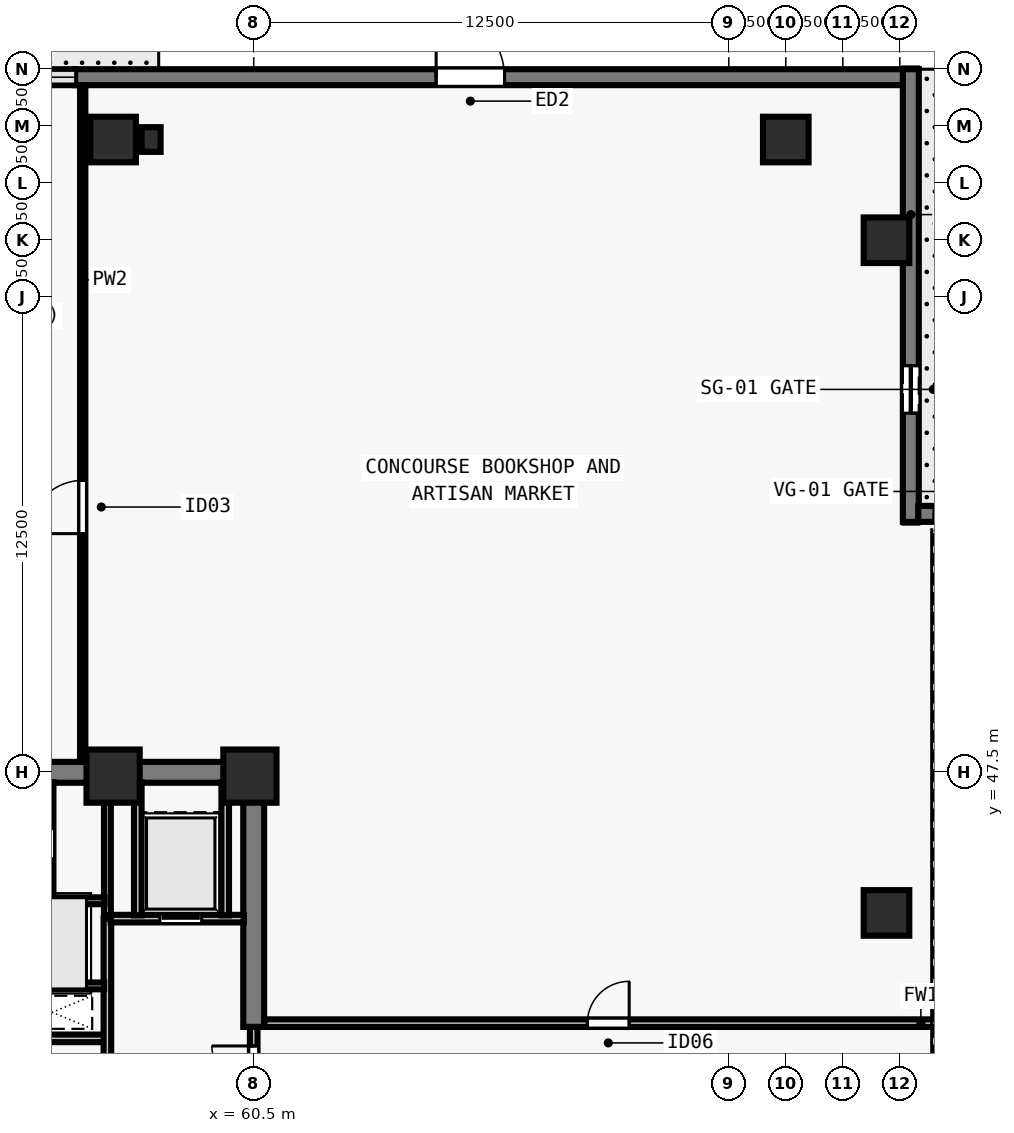
"""IFC4 building model, lengths in metres.
Left out: names, types, materials, properties, quantities, classifications, styles, units other than length and angle.
Written with IfcOpenShell. Run it as: python <this file> out.ifc"""

import sys

from ifc_helpers import new_model, si_unit, direction, frame, frame_2d, origin, origin_2d, place, context, subcontext, project, spatial, rectangle, extrude, element, fill, save


model = new_model("IFC4")
c1 = context("Model", 3, precision=1e-05, world=origin(), true_north=direction((0.0, 1.0)))
c2 = subcontext(c1, "Body", "Model", "MODEL_VIEW")
j1 = project(units=[si_unit("LENGTHUNIT", "METRE"), si_unit("PLANEANGLEUNIT", "RADIAN")], contexts=[c1])
p1 = place(None, origin())
s1 = spatial("IfcSite", under=j1, at=p1, CompositionType="ELEMENT")
p2 = place(p1, origin())
s2 = spatial("IfcBuilding", under=s1, at=p2, CompositionType="ELEMENT")
p3 = place(p2, origin())
s3 = spatial("IfcBuildingStorey", under=s2, at=p3, CompositionType="ELEMENT", Elevation=0.0)
for number, where, z_axis, x_axis in (
    (1, (56.8, 47.4, 0.0), (0.0, 0.0, 1.0), (1.0, 0.0, 0.0)),
    (2, (60.4, 47.4, 0.0), (0.0, 0.0, 1.0), (1.0, 0.0, 0.0)),
):
    element("IfcColumn", number, at=place(p3, frame(where, z_axis=z_axis, x_axis=x_axis)), inside=s3, PredefinedType="COLUMN", context=c2, shape_type="SweptSolid", body=[
        extrude(rectangle(XDim=1.4, YDim=1.4, at=origin_2d()), origin(), (0.0, 0.0, 1.0), 5.0),
    ])
for number, where, z_axis, x_axis in (
    (3, (77.15, 43.8, 0.0), (0.0, 0.0, 1.0), (1.0, 0.0, 0.0)),
    (4, (77.15, 61.5, 0.0), (0.0, 0.0, 1.0), (1.0, 0.0, 0.0)),
    (5, (74.5, 64.15, 0.0), (0.0, 0.0, 1.0), (1.0, 0.0, 0.0)),
    (6, (56.8, 64.15, 0.0), (0.0, 0.0, 1.0), (1.0, 0.0, 0.0)),
):
    element("IfcColumn", number, at=place(p3, frame(where, z_axis=z_axis, x_axis=x_axis)), inside=s3, PredefinedType="COLUMN", context=c2, shape_type="SweptSolid", body=[
        extrude(rectangle(XDim=1.2, YDim=1.2, at=origin_2d()), origin(), (0.0, 0.0, 1.0), 5.0),
    ])
p4 = place(p3, frame((57.8, 64.15, 0.0), z_axis=(0.0, 0.0, 1.0), x_axis=(1.0, 0.0, 0.0)))
e7 = element("IfcColumn", 7, at=p4, inside=s3, PredefinedType="PILASTER", context=c2, shape_type="SweptSolid", body=[
    extrude(rectangle(XDim=0.5, YDim=0.65, at=origin_2d()), origin(), (0.0, 0.0, 1.0), 5.0),
])
p5 = place(p3, frame((48.2, 65.79, 0.0), z_axis=(0.0, 0.0, 1.0), x_axis=(1.0, 0.0, 0.0)))
e8 = element("IfcWall", 8, at=p5, inside=s3, PredefinedType="SOLIDWALL", context=c2, shape_type="SweptSolid", body=[
    extrude(rectangle(XDim=7.6, YDim=0.42, at=frame_2d((3.8, 0.0))), origin(), (0.0, 0.0, 1.0), 2.85),
])
p6 = place(p5, frame((2.6, 0.0, 0.0)))
e9 = element("IfcOpeningElement", 9, at=p6, cuts=e8, PredefinedType="OPENING", context=c2, shape_type="SweptSolid", body=[
    extrude(rectangle(XDim=2.4, YDim=2.7, at=frame_2d((1.2, 1.35))), frame((0.0, 0.22, 0.0), z_axis=(0.0, -1.0, 0.0), x_axis=(1.0, 0.0, 0.0)), (0.0, 0.0, 1.0), 0.44),
])
p7 = place(p3, frame((55.8, 65.79, 0.0), z_axis=(0.0, 0.0, 1.0), x_axis=(1.0, 0.0, 0.0)))
e10 = element("IfcWall", 10, at=p7, inside=s3, PredefinedType="SOLIDWALL", context=c2, shape_type="SweptSolid", body=[
    extrude(rectangle(XDim=21.795, YDim=0.42, at=frame_2d((10.897, 0.0))), origin(), (0.0, 0.0, 1.0), 4.7),
])
p8 = place(p7, frame((9.5, 0.0, 0.0)))
e11 = element("IfcOpeningElement", 11, at=p8, cuts=e10, PredefinedType="OPENING", context=c2, shape_type="SweptSolid", body=[
    extrude(rectangle(XDim=1.8, YDim=2.35, at=frame_2d((0.9, 1.175))), frame((0.0, 0.22, 0.0), z_axis=(0.0, -1.0, 0.0), x_axis=(1.0, 0.0, 0.0)), (0.0, 0.0, 1.0), 0.44),
])
p9 = place(p3, frame((77.79, 66.0, 0.0), z_axis=(0.0, 0.0, 1.0), x_axis=(0.0, -1.0, 0.0)))
e12 = element("IfcWall", 12, at=p9, inside=s3, PredefinedType="SOLIDWALL", context=c2, shape_type="SweptSolid", body=[
    extrude(rectangle(XDim=11.91, YDim=0.42, at=frame_2d((5.955, 0.0))), origin(), (0.0, 0.0, 1.0), 4.7),
])
p10 = place(p9, frame((7.8, 0.0, 0.0)))
e13 = element("IfcOpeningElement", 13, at=p10, cuts=e12, PredefinedType="OPENING", context=c2, shape_type="SweptSolid", body=[
    extrude(rectangle(XDim=1.25, YDim=2.15, at=frame_2d((0.625, 1.075))), frame((0.0, 0.22, 0.0), z_axis=(0.0, -1.0, 0.0), x_axis=(1.0, 0.0, 0.0)), (0.0, 0.0, 1.0), 0.44),
])
p11 = place(p3, frame((77.985, 54.3, 0.0), z_axis=(0.0, 0.0, 1.0), x_axis=(1.0, 0.0, 0.0)))
e14 = element("IfcWall", 14, at=p11, inside=s3, PredefinedType="SOLIDWALL", context=c2, shape_type="SweptSolid", body=[
    extrude(rectangle(XDim=7.61, YDim=0.42, at=frame_2d((3.805, 0.0))), origin(), (0.0, 0.0, 1.0), 4.7),
])
p12 = place(p11, frame((0.415, 0.0, 0.0)))
e15 = element("IfcOpeningElement", 15, at=p12, cuts=e14, PredefinedType="OPENING", context=c2, shape_type="SweptSolid", body=[
    extrude(rectangle(XDim=6.2, YDim=3.1, at=frame_2d((3.1, 1.55))), frame((0.0, 0.22, 0.0), z_axis=(0.0, -1.0, 0.0), x_axis=(1.0, 0.0, 0.0)), (0.0, 0.0, 1.0), 0.44),
])
p13 = place(p3, frame((43.225, 47.5, 0.0), z_axis=(0.0, 0.0, 1.0), x_axis=(1.0, 0.0, 0.0)))
e16 = element("IfcWall", 16, at=p13, inside=s3, PredefinedType="SHEAR", context=c2, shape_type="SweptSolid", body=[
    extrude(rectangle(XDim=17.55, YDim=0.55, at=frame_2d((8.775, 0.0))), origin(), (0.0, 0.0, 1.0), 4.7),
])
p14 = place(p3, frame((60.5, 40.8, 0.0), z_axis=(0.0, 0.0, 1.0), x_axis=(0.0, 1.0, 0.0)))
e17 = element("IfcWall", 17, at=p14, inside=s3, PredefinedType="SHEAR", context=c2, shape_type="SweptSolid", body=[
    extrude(rectangle(XDim=6.435, YDim=0.55, at=frame_2d((3.218, 0.0))), origin(), (0.0, 0.0, 1.0), 4.7),
])
p15 = place(p3, frame((53.7, 40.5, 0.0), z_axis=(0.0, 0.0, 1.0), x_axis=(1.0, 0.0, 0.0)))
e18 = element("IfcWall", 18, at=p15, inside=s3, PredefinedType="SOLIDWALL", context=c2, shape_type="SweptSolid", body=[
    extrude(rectangle(XDim=2.95, YDim=0.2, at=frame_2d((1.475, 0.0))), origin(), (0.0, 0.0, 1.0), 4.7),
])
p16 = place(p3, frame((60.5, 38.75, 0.0), z_axis=(0.0, 0.0, 1.0), x_axis=(0.0, 1.0, 0.0)))
e19 = element("IfcWall", 19, at=p16, inside=s3, PredefinedType="SOLIDWALL", context=c2, shape_type="SweptSolid", body=[
    extrude(rectangle(XDim=2.05, YDim=0.2, at=frame_2d((1.025, 0.0))), origin(), (0.0, 0.0, 1.0), 4.7),
])
p17 = place(p16, frame((0.45, 0.0, 0.0)))
e20 = element("IfcOpeningElement", 20, at=p17, cuts=e19, PredefinedType="OPENING", context=c2, shape_type="SweptSolid", body=[
    extrude(rectangle(XDim=1.1, YDim=2.15, at=frame_2d((0.55, 1.075))), frame((0.0, 0.11, 0.0), z_axis=(0.0, -1.0, 0.0), x_axis=(1.0, 0.0, 0.0)), (0.0, 0.0, 1.0), 0.22),
])
p18 = place(p3, frame((56.65, 38.785, 0.0), z_axis=(0.0, 0.0, 1.0), x_axis=(0.0, 1.0, 0.0)))
e21 = element("IfcWall", 21, at=p18, inside=s3, PredefinedType="SOLIDWALL", context=c2, shape_type="SweptSolid", body=[
    extrude(rectangle(XDim=4.865, YDim=0.2, at=frame_2d((2.433, 0.0))), origin(), (0.0, 0.0, 1.0), 4.7),
])
p19 = place(p18, frame((0.265, 0.0, 0.0)))
e22 = element("IfcOpeningElement", 22, at=p19, cuts=e21, PredefinedType="OPENING", context=c2, shape_type="SweptSolid", body=[
    extrude(rectangle(XDim=1.0, YDim=2.15, at=frame_2d((0.5, 1.075))), frame((0.0, 0.11, 0.0), z_axis=(0.0, -1.0, 0.0), x_axis=(1.0, 0.0, 0.0)), (0.0, 0.0, 1.0), 0.22),
])
p20 = place(p3, frame((56.735, 43.65, 0.0), z_axis=(0.0, 0.0, 1.0), x_axis=(1.0, 0.0, 0.0)))
e23 = element("IfcWall", 23, at=p20, inside=s3, PredefinedType="SOLIDWALL", context=c2, shape_type="SweptSolid", body=[
    extrude(rectangle(XDim=3.505, YDim=0.2, at=frame_2d((1.752, 0.0))), origin(), (0.0, 0.0, 1.0), 4.7),
])
p21 = place(p20, frame((1.295, 0.0, 0.0)))
e24 = element("IfcOpeningElement", 24, at=p21, cuts=e23, PredefinedType="OPENING", context=c2, shape_type="SweptSolid", body=[
    extrude(rectangle(XDim=1.1, YDim=2.2, at=frame_2d((0.55, 1.1))), frame((0.0, 0.11, 0.0), z_axis=(0.0, -1.0, 0.0), x_axis=(1.0, 0.0, 0.0)), (0.0, 0.0, 1.0), 0.22),
])
for number, where, z_axis, x_axis in (
    (25, (57.45, 43.735, 0.0), (0.0, 0.0, 1.0), (0.0, 1.0, 0.0)),
    (26, (59.75, 43.735, 0.0), (0.0, 0.0, 1.0), (0.0, 1.0, 0.0)),
):
    element("IfcWall", number, at=place(p3, frame(where, z_axis=z_axis, x_axis=x_axis)), inside=s3, PredefinedType="SOLIDWALL", context=c2, shape_type="SweptSolid", body=[
        extrude(rectangle(XDim=3.505, YDim=0.2, at=frame_2d((1.752, 0.0))), origin(), (0.0, 0.0, 1.0), 4.7),
    ])
p22 = place(p3, frame((56.65, 43.735, 0.0), z_axis=(0.0, 0.0, 1.0), x_axis=(0.0, 1.0, 0.0)))
e27 = element("IfcWall", 27, at=p22, inside=s3, PredefinedType="SOLIDWALL", context=c2, shape_type="SweptSolid", body=[
    extrude(rectangle(XDim=3.505, YDim=0.18, at=frame_2d((1.752, 0.0))), origin(), (0.0, 0.0, 1.0), 4.7),
])
p23 = place(p3, frame((53.785, 41.88, 0.0), z_axis=(0.0, 0.0, 1.0), x_axis=(1.0, 0.0, 0.0)))
e28 = element("IfcWall", 28, at=p23, inside=s3, PredefinedType="SOLIDWALL", context=c2, shape_type="SweptSolid", body=[
    extrude(rectangle(XDim=2.78, YDim=0.18, at=frame_2d((1.39, 0.0))), origin(), (0.0, 0.0, 1.0), 4.7),
])
p24 = place(p3, frame((53.785, 44.12, 0.0), z_axis=(0.0, 0.0, 1.0), x_axis=(1.0, 0.0, 0.0)))
e29 = element("IfcWall", 29, at=p24, inside=s3, PredefinedType="SOLIDWALL", context=c2, shape_type="SweptSolid", body=[
    extrude(rectangle(XDim=2.79, YDim=0.18, at=frame_2d((1.395, 0.0))), origin(), (0.0, 0.0, 1.0), 4.7),
])
p25 = place(p3, frame((55.15, 44.195, 0.0), z_axis=(0.0, 0.0, 1.0), x_axis=(0.0, 1.0, 0.0)))
e30 = element("IfcWall", 30, at=p25, inside=s3, PredefinedType="PARTITIONING", context=c2, shape_type="SweptSolid", body=[
    extrude(rectangle(XDim=3.045, YDim=0.16, at=frame_2d((1.522, 0.0))), origin(), (0.0, 0.0, 1.0), 4.7),
])
p26 = place(p25, frame((1.025, 0.0, 0.0)))
e31 = element("IfcOpeningElement", 31, at=p26, cuts=e30, PredefinedType="OPENING", context=c2, shape_type="SweptSolid", body=[
    extrude(rectangle(XDim=0.8, YDim=2.1, at=frame_2d((0.4, 1.05))), frame((0.0, 0.09, 0.0), z_axis=(0.0, -1.0, 0.0), x_axis=(1.0, 0.0, 0.0)), (0.0, 0.0, 1.0), 0.18),
])
p27 = place(p3, frame((56.0, 47.78, 0.0), z_axis=(0.0, 0.0, 1.0), x_axis=(0.0, 1.0, 0.0)))
e32 = element("IfcWall", 32, at=p27, inside=s3, PredefinedType="PARTITIONING", context=c2, shape_type="SweptSolid", body=[
    extrude(rectangle(XDim=17.8, YDim=0.14, at=frame_2d((8.9, 0.0))), origin(), (0.0, 0.0, 1.0), 4.7),
])
p28 = place(p27, frame((6.0, 0.0, 0.0)))
e33 = element("IfcOpeningElement", 33, at=p28, cuts=e32, PredefinedType="OPENING", context=c2, shape_type="SweptSolid", body=[
    extrude(rectangle(XDim=1.4, YDim=2.2, at=frame_2d((0.7, 1.1))), frame((0.0, 0.08, 0.0), z_axis=(0.0, -1.0, 0.0), x_axis=(1.0, 0.0, 0.0)), (0.0, 0.0, 1.0), 0.16),
])
p29 = place(p3, frame((60.78, 40.9, 0.0), z_axis=(0.0, 0.0, 1.0), x_axis=(1.0, 0.0, 0.0)))
e34 = element("IfcWall", 34, at=p29, inside=s3, PredefinedType="SOLIDWALL", context=c2, shape_type="SweptSolid", body=[
    extrude(rectangle(XDim=24.8, YDim=0.2, at=frame_2d((12.4, 0.0))), origin(), (0.0, 0.0, 1.0), 4.7),
])
p30 = place(p29, frame((8.5, 0.0, 0.0)))
e35 = element("IfcOpeningElement", 35, at=p30, cuts=e34, PredefinedType="OPENING", context=c2, shape_type="SweptSolid", body=[
    extrude(rectangle(XDim=1.1, YDim=2.15, at=frame_2d((0.55, 1.075))), frame((0.0, 0.11, 0.0), z_axis=(0.0, -1.0, 0.0), x_axis=(1.0, 0.0, 0.0)), (0.0, 0.0, 1.0), 0.22),
])
p31 = place(p8, origin())
e36 = element("IfcDoor", 36, at=p31, inside=s3, OperationType="SINGLE_SWING_LEFT", PredefinedType="DOOR", context=c2, shape_type="SweptSolid", body=[
    extrude(rectangle(XDim=1.8, YDim=2.35, at=frame_2d((0.9, 1.175))), frame((0.0, 0.025, 0.0), z_axis=(0.0, -1.0, 0.0), x_axis=(1.0, 0.0, 0.0)), (0.0, 0.0, 1.0), 0.05),
])
fill(e11, e36)
p32 = place(p10, origin())
e37 = element("IfcDoor", 37, at=p32, inside=s3, OperationType="SINGLE_SWING_LEFT", PredefinedType="GATE", context=c2, shape_type="SweptSolid", body=[
    extrude(rectangle(XDim=1.25, YDim=2.15, at=frame_2d((0.625, 1.075))), frame((0.0, 0.025, 0.0), z_axis=(0.0, -1.0, 0.0), x_axis=(1.0, 0.0, 0.0)), (0.0, 0.0, 1.0), 0.05),
])
fill(e13, e37)
p33 = place(p17, origin())
e38 = element("IfcDoor", 38, at=p33, inside=s3, OperationType="SINGLE_SWING_RIGHT", PredefinedType="DOOR", context=c2, shape_type="SweptSolid", body=[
    extrude(rectangle(XDim=1.1, YDim=2.15, at=frame_2d((0.55, 1.075))), frame((0.0, 0.025, 0.0), z_axis=(0.0, -1.0, 0.0), x_axis=(1.0, 0.0, 0.0)), (0.0, 0.0, 1.0), 0.05),
])
fill(e20, e38)
p34 = place(p21, origin())
e39 = element("IfcDoor", 39, at=p34, inside=s3, OperationType="SLIDING_TO_LEFT", PredefinedType="DOOR", context=c2, shape_type="SweptSolid", body=[
    extrude(rectangle(XDim=1.1, YDim=2.2, at=frame_2d((0.55, 1.1))), frame((0.0, 0.025, 0.0), z_axis=(0.0, -1.0, 0.0), x_axis=(1.0, 0.0, 0.0)), (0.0, 0.0, 1.0), 0.05),
])
fill(e24, e39)
p35 = place(p28, origin())
e40 = element("IfcDoor", 40, at=p35, inside=s3, OperationType="SINGLE_SWING_LEFT", PredefinedType="DOOR", context=c2, shape_type="SweptSolid", body=[
    extrude(rectangle(XDim=1.4, YDim=2.2, at=frame_2d((0.7, 1.1))), frame((0.0, 0.025, 0.0), z_axis=(0.0, -1.0, 0.0), x_axis=(1.0, 0.0, 0.0)), (0.0, 0.0, 1.0), 0.05),
])
fill(e33, e40)
p36 = place(p30, origin())
e41 = element("IfcDoor", 41, at=p36, inside=s3, OperationType="SINGLE_SWING_RIGHT", PredefinedType="DOOR", context=c2, shape_type="SweptSolid", body=[
    extrude(rectangle(XDim=1.1, YDim=2.15, at=frame_2d((0.55, 1.075))), frame((0.0, 0.025, 0.0), z_axis=(0.0, -1.0, 0.0), x_axis=(1.0, 0.0, 0.0)), (0.0, 0.0, 1.0), 0.05),
])
fill(e35, e41)
save(model, sys.argv[1])
